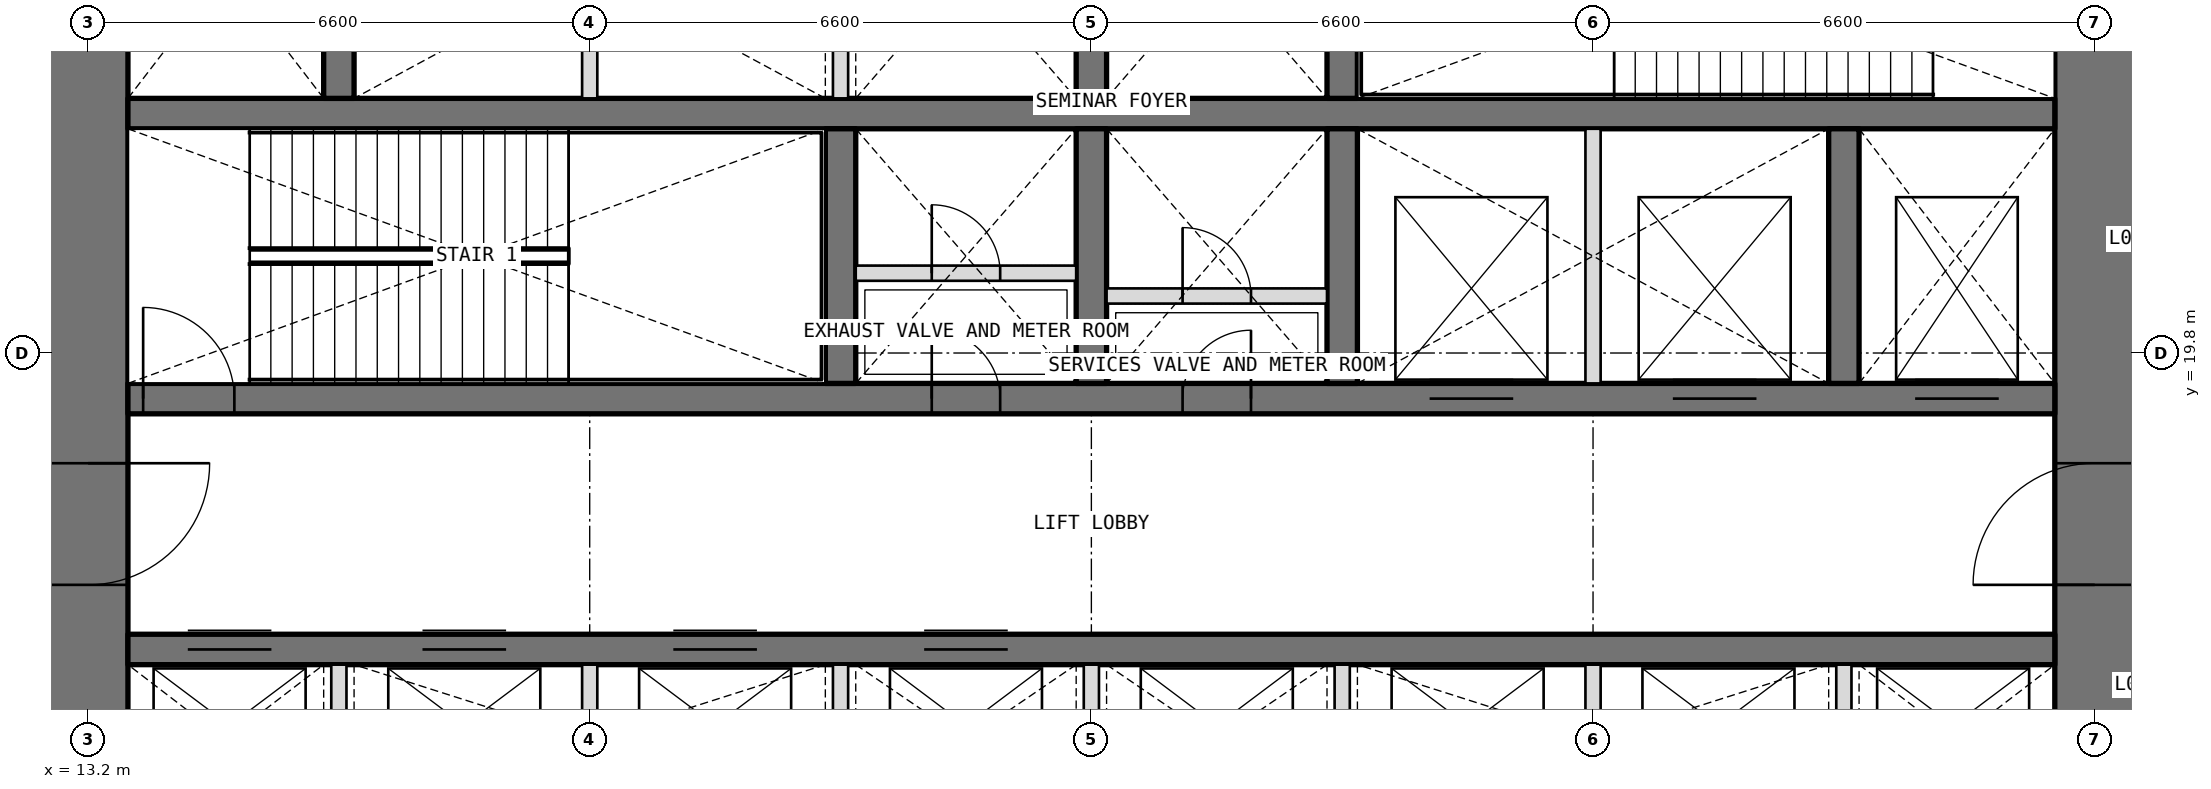
"""IFC4 building model, lengths in metres.
Left out: names, types, materials, properties, quantities, classifications, styles, units other than length and angle.
Written with IfcOpenShell. Run it as: python <this file> out.ifc"""

import sys

from ifc_helpers import new_model, si_unit, direction, frame, frame_2d, origin, place, context, subcontext, project, spatial, rectangle, extrude, element, fill, save


model = new_model("IFC4")
c1 = context("Model", 3, precision=1e-05, world=origin(), true_north=direction((0.0, 1.0)))
c2 = subcontext(c1, "Body", "Model", "MODEL_VIEW")
j1 = project(units=[si_unit("LENGTHUNIT", "METRE"), si_unit("PLANEANGLEUNIT", "RADIAN")], contexts=[c1])
p1 = place(None, origin())
s1 = spatial("IfcSite", under=j1, at=p1, CompositionType="ELEMENT")
p2 = place(p1, origin())
s2 = spatial("IfcBuilding", under=s1, at=p2, CompositionType="ELEMENT")
p3 = place(p2, frame((0.0, 0.0, 7.2)))
s3 = spatial("IfcBuildingStorey", under=s2, at=p3, CompositionType="ELEMENT", Elevation=7.2)
p4 = place(p3, frame((39.6, 13.725, 0.0), z_axis=(0.0, 0.0, 1.0), x_axis=(0.0, 1.0, 0.0)))
e1 = element("IfcWall", 1, at=p4, inside=s3, PredefinedType="SHEAR", context=c2, shape_type="SweptSolid", body=[
    extrude(rectangle(XDim=18.75, YDim=1.05, at=frame_2d((9.375, 0.0))), origin(), (0.0, 0.0, 1.0), 5.4),
])
p5 = place(p4, frame((3.025, 0.0, 0.0)))
e2 = element("IfcOpeningElement", 2, at=p5, cuts=e1, PredefinedType="OPENING", context=c2, shape_type="SweptSolid", body=[
    extrude(rectangle(XDim=1.6, YDim=2.1, at=frame_2d((0.8, 1.05))), frame((0.0, 0.535, 0.0), z_axis=(0.0, -1.0, 0.0), x_axis=(1.0, 0.0, 0.0)), (0.0, 0.0, 1.0), 1.07),
])
p6 = place(p4, frame((13.825, 0.0, 0.0)))
e3 = element("IfcOpeningElement", 3, at=p6, cuts=e1, PredefinedType="OPENING", context=c2, shape_type="SweptSolid", body=[
    extrude(rectangle(XDim=1.6, YDim=2.1, at=frame_2d((0.8, 1.05))), frame((0.0, 0.535, 0.0), z_axis=(0.0, -1.0, 0.0), x_axis=(1.0, 0.0, 0.0)), (0.0, 0.0, 1.0), 1.07),
])
p7 = place(p3, frame((13.2, 32.475, 0.0), z_axis=(0.0, 0.0, 1.0), x_axis=(0.0, -1.0, 0.0)))
e4 = element("IfcWall", 4, at=p7, inside=s3, PredefinedType="SHEAR", context=c2, shape_type="SweptSolid", body=[
    extrude(rectangle(XDim=18.75, YDim=1.05, at=frame_2d((9.375, 0.0))), origin(), (0.0, 0.0, 1.0), 5.4),
])
p8 = place(p7, frame((14.125, 0.0, 0.0)))
e5 = element("IfcOpeningElement", 5, at=p8, cuts=e4, PredefinedType="OPENING", context=c2, shape_type="SweptSolid", body=[
    extrude(rectangle(XDim=1.6, YDim=2.1, at=frame_2d((0.8, 1.05))), frame((0.0, 0.535, 0.0), z_axis=(0.0, -1.0, 0.0), x_axis=(1.0, 0.0, 0.0)), (0.0, 0.0, 1.0), 1.07),
])
p9 = place(p7, frame((3.325, 0.0, 0.0)))
e6 = element("IfcOpeningElement", 6, at=p9, cuts=e4, PredefinedType="OPENING", context=c2, shape_type="SweptSolid", body=[
    extrude(rectangle(XDim=1.6, YDim=2.1, at=frame_2d((0.8, 1.05))), frame((0.0, 0.535, 0.0), z_axis=(0.0, -1.0, 0.0), x_axis=(1.0, 0.0, 0.0)), (0.0, 0.0, 1.0), 1.07),
])
p10 = place(p3, frame((13.725, 15.9, 0.0), z_axis=(0.0, 0.0, 1.0), x_axis=(1.0, 0.0, 0.0)))
e7 = element("IfcWall", 7, at=p10, inside=s3, PredefinedType="SHEAR", context=c2, shape_type="SweptSolid", body=[
    extrude(rectangle(XDim=25.35, YDim=0.4, at=frame_2d((12.675, 0.0))), origin(), (0.0, 0.0, 1.0), 5.4),
])
p11 = place(p10, frame((0.788, 0.0, 0.0)))
e8 = element("IfcOpeningElement", 8, at=p11, cuts=e7, PredefinedType="OPENING", context=c2, shape_type="SweptSolid", body=[
    extrude(rectangle(XDim=1.1, YDim=2.1, at=frame_2d((0.55, 1.05))), frame((0.0, 0.21, 0.0), z_axis=(0.0, -1.0, 0.0), x_axis=(1.0, 0.0, 0.0)), (0.0, 0.0, 1.0), 0.42),
])
p12 = place(p10, frame((3.875, 0.0, 0.0)))
e9 = element("IfcOpeningElement", 9, at=p12, cuts=e7, PredefinedType="OPENING", context=c2, shape_type="SweptSolid", body=[
    extrude(rectangle(XDim=1.1, YDim=2.1, at=frame_2d((0.55, 1.05))), frame((0.0, 0.21, 0.0), z_axis=(0.0, -1.0, 0.0), x_axis=(1.0, 0.0, 0.0)), (0.0, 0.0, 1.0), 0.42),
])
p13 = place(p10, frame((7.175, 0.0, 0.0)))
e10 = element("IfcOpeningElement", 10, at=p13, cuts=e7, PredefinedType="OPENING", context=c2, shape_type="SweptSolid", body=[
    extrude(rectangle(XDim=1.1, YDim=2.1, at=frame_2d((0.55, 1.05))), frame((0.0, 0.21, 0.0), z_axis=(0.0, -1.0, 0.0), x_axis=(1.0, 0.0, 0.0)), (0.0, 0.0, 1.0), 0.42),
])
p14 = place(p10, frame((10.475, 0.0, 0.0)))
e11 = element("IfcOpeningElement", 11, at=p14, cuts=e7, PredefinedType="OPENING", context=c2, shape_type="SweptSolid", body=[
    extrude(rectangle(XDim=1.1, YDim=2.1, at=frame_2d((0.55, 1.05))), frame((0.0, 0.21, 0.0), z_axis=(0.0, -1.0, 0.0), x_axis=(1.0, 0.0, 0.0)), (0.0, 0.0, 1.0), 0.42),
])
p15 = place(p3, frame((13.725, 19.2, 0.0), z_axis=(0.0, 0.0, 1.0), x_axis=(1.0, 0.0, 0.0)))
e12 = element("IfcWall", 12, at=p15, inside=s3, PredefinedType="SHEAR", context=c2, shape_type="SweptSolid", body=[
    extrude(rectangle(XDim=25.35, YDim=0.4, at=frame_2d((12.675, 0.0))), origin(), (0.0, 0.0, 1.0), 5.4),
])
p16 = place(p15, frame((10.575, 0.0, 0.0)))
e13 = element("IfcOpeningElement", 13, at=p16, cuts=e12, PredefinedType="OPENING", context=c2, shape_type="SweptSolid", body=[
    extrude(rectangle(XDim=0.9, YDim=2.1, at=frame_2d((0.45, 1.05))), frame((0.0, 0.21, 0.0), z_axis=(0.0, -1.0, 0.0), x_axis=(1.0, 0.0, 0.0)), (0.0, 0.0, 1.0), 0.42),
])
p17 = place(p15, frame((13.875, 0.0, 0.0)))
e14 = element("IfcOpeningElement", 14, at=p17, cuts=e12, PredefinedType="OPENING", context=c2, shape_type="SweptSolid", body=[
    extrude(rectangle(XDim=0.9, YDim=2.1, at=frame_2d((0.45, 1.05))), frame((0.0, 0.21, 0.0), z_axis=(0.0, -1.0, 0.0), x_axis=(1.0, 0.0, 0.0)), (0.0, 0.0, 1.0), 0.42),
])
p18 = place(p15, frame((0.2, 0.0, 0.0)))
e15 = element("IfcOpeningElement", 15, at=p18, cuts=e12, PredefinedType="OPENING", context=c2, shape_type="SweptSolid", body=[
    extrude(rectangle(XDim=1.2, YDim=2.1, at=frame_2d((0.6, 1.05))), frame((0.0, 0.21, 0.0), z_axis=(0.0, -1.0, 0.0), x_axis=(1.0, 0.0, 0.0)), (0.0, 0.0, 1.0), 0.42),
])
p19 = place(p15, frame((23.512, 0.0, 0.0)))
e16 = element("IfcOpeningElement", 16, at=p19, cuts=e12, PredefinedType="OPENING", context=c2, shape_type="SweptSolid", body=[
    extrude(rectangle(XDim=1.1, YDim=2.1, at=frame_2d((0.55, 1.05))), frame((0.0, 0.21, 0.0), z_axis=(0.0, -1.0, 0.0), x_axis=(1.0, 0.0, 0.0)), (0.0, 0.0, 1.0), 0.42),
])
p20 = place(p15, frame((17.125, 0.0, 0.0)))
e17 = element("IfcOpeningElement", 17, at=p20, cuts=e12, PredefinedType="OPENING", context=c2, shape_type="SweptSolid", body=[
    extrude(rectangle(XDim=1.1, YDim=2.1, at=frame_2d((0.55, 1.05))), frame((0.0, 0.21, 0.0), z_axis=(0.0, -1.0, 0.0), x_axis=(1.0, 0.0, 0.0)), (0.0, 0.0, 1.0), 0.42),
])
p21 = place(p15, frame((20.325, 0.0, 0.0)))
e18 = element("IfcOpeningElement", 18, at=p21, cuts=e12, PredefinedType="OPENING", context=c2, shape_type="SweptSolid", body=[
    extrude(rectangle(XDim=1.1, YDim=2.1, at=frame_2d((0.55, 1.05))), frame((0.0, 0.21, 0.0), z_axis=(0.0, -1.0, 0.0), x_axis=(1.0, 0.0, 0.0)), (0.0, 0.0, 1.0), 0.42),
])
p22 = place(p3, frame((13.725, 22.95, 0.0), z_axis=(0.0, 0.0, 1.0), x_axis=(1.0, 0.0, 0.0)))
e19 = element("IfcWall", 19, at=p22, inside=s3, PredefinedType="SHEAR", context=c2, shape_type="SweptSolid", body=[
    extrude(rectangle(XDim=25.35, YDim=0.4, at=frame_2d((12.675, 0.0))), origin(), (0.0, 0.0, 1.0), 5.4),
])
for number, where, z_axis, x_axis in (
    (20, (23.1, 19.4, 0.0), (0.0, 0.0, 1.0), (0.0, 1.0, 0.0)),
    (21, (26.4, 19.4, 0.0), (0.0, 0.0, 1.0), (0.0, 1.0, 0.0)),
    (22, (29.7, 19.4, 0.0), (0.0, 0.0, 1.0), (0.0, 1.0, 0.0)),
    (23, (36.3, 19.4, 0.0), (0.0, 0.0, 1.0), (0.0, 1.0, 0.0)),
    (24, (16.5, 23.15, 0.0), (0.0, 0.0, 1.0), (0.0, 1.0, 0.0)),
    (25, (26.4, 23.15, 0.0), (0.0, 0.0, 1.0), (0.0, 1.0, 0.0)),
    (26, (29.7, 23.15, 0.0), (0.0, 0.0, 1.0), (0.0, 1.0, 0.0)),
):
    element("IfcWall", number, at=place(p3, frame(where, z_axis=z_axis, x_axis=x_axis)), inside=s3, PredefinedType="SHEAR", context=c2, shape_type="SweptSolid", body=[
        extrude(rectangle(XDim=3.35, YDim=0.4, at=frame_2d((1.675, 0.0))), origin(), (0.0, 0.0, 1.0), 5.4),
    ])
for number, where, z_axis, x_axis in (
    (27, (16.5, 13.725, 0.0), (0.0, 0.0, 1.0), (0.0, 1.0, 0.0)),
    (28, (19.8, 13.725, 0.0), (0.0, 0.0, 1.0), (0.0, 1.0, 0.0)),
    (29, (23.1, 13.725, 0.0), (0.0, 0.0, 1.0), (0.0, 1.0, 0.0)),
    (30, (26.4, 13.725, 0.0), (0.0, 0.0, 1.0), (0.0, 1.0, 0.0)),
    (31, (29.7, 13.725, 0.0), (0.0, 0.0, 1.0), (0.0, 1.0, 0.0)),
    (32, (33.0, 13.725, 0.0), (0.0, 0.0, 1.0), (0.0, 1.0, 0.0)),
    (33, (36.3, 13.725, 0.0), (0.0, 0.0, 1.0), (0.0, 1.0, 0.0)),
):
    element("IfcWall", number, at=place(p3, frame(where, z_axis=z_axis, x_axis=x_axis)), inside=s3, PredefinedType="PARTITIONING", context=c2, shape_type="SweptSolid", body=[
        extrude(rectangle(XDim=1.975, YDim=0.2, at=frame_2d((0.987, 0.0))), origin(), (0.0, 0.0, 1.0), 5.4),
    ])
for number, where, z_axis, x_axis in (
    (34, (33.0, 19.4, 0.0), (0.0, 0.0, 1.0), (0.0, 1.0, 0.0)),
    (35, (19.8, 23.15, 0.0), (0.0, 0.0, 1.0), (0.0, 1.0, 0.0)),
    (36, (23.1, 23.15, 0.0), (0.0, 0.0, 1.0), (0.0, 1.0, 0.0)),
):
    element("IfcWall", number, at=place(p3, frame(where, z_axis=z_axis, x_axis=x_axis)), inside=s3, PredefinedType="PARTITIONING", context=c2, shape_type="SweptSolid", body=[
        extrude(rectangle(XDim=3.35, YDim=0.2, at=frame_2d((1.675, 0.0))), origin(), (0.0, 0.0, 1.0), 5.4),
    ])
p23 = place(p3, frame((23.3, 20.85, 0.0), z_axis=(0.0, 0.0, 1.0), x_axis=(1.0, 0.0, 0.0)))
e37 = element("IfcWall", 37, at=p23, inside=s3, PredefinedType="PARTITIONING", context=c2, shape_type="SweptSolid", body=[
    extrude(rectangle(XDim=2.9, YDim=0.2, at=frame_2d((1.45, 0.0))), origin(), (0.0, 0.0, 1.0), 5.1),
])
p24 = place(p23, frame((1.0, 0.0, 0.0)))
e38 = element("IfcOpeningElement", 38, at=p24, cuts=e37, PredefinedType="OPENING", context=c2, shape_type="SweptSolid", body=[
    extrude(rectangle(XDim=0.9, YDim=2.1, at=frame_2d((0.45, 1.05))), frame((0.0, 0.11, 0.0), z_axis=(0.0, -1.0, 0.0), x_axis=(1.0, 0.0, 0.0)), (0.0, 0.0, 1.0), 0.22),
])
p25 = place(p3, frame((26.6, 20.55, 0.0), z_axis=(0.0, 0.0, 1.0), x_axis=(1.0, 0.0, 0.0)))
e39 = element("IfcWall", 39, at=p25, inside=s3, PredefinedType="PARTITIONING", context=c2, shape_type="SweptSolid", body=[
    extrude(rectangle(XDim=2.9, YDim=0.2, at=frame_2d((1.45, 0.0))), origin(), (0.0, 0.0, 1.0), 5.1),
])
p26 = place(p25, frame((1.0, 0.0, 0.0)))
e40 = element("IfcOpeningElement", 40, at=p26, cuts=e39, PredefinedType="OPENING", context=c2, shape_type="SweptSolid", body=[
    extrude(rectangle(XDim=0.9, YDim=2.1, at=frame_2d((0.45, 1.05))), frame((0.0, 0.11, 0.0), z_axis=(0.0, -1.0, 0.0), x_axis=(1.0, 0.0, 0.0)), (0.0, 0.0, 1.0), 0.22),
])
p27 = place(p16, origin())
e41 = element("IfcDoor", 41, at=p27, inside=s3, OperationType="SINGLE_SWING_LEFT", PredefinedType="DOOR", context=c2, shape_type="SweptSolid", body=[
    extrude(rectangle(XDim=0.9, YDim=2.1, at=frame_2d((0.45, 1.05))), frame((0.0, 0.025, 0.0), z_axis=(0.0, -1.0, 0.0), x_axis=(1.0, 0.0, 0.0)), (0.0, 0.0, 1.0), 0.05),
])
fill(e13, e41)
p28 = place(p24, origin())
e42 = element("IfcDoor", 42, at=p28, inside=s3, OperationType="SINGLE_SWING_LEFT", PredefinedType="DOOR", context=c2, shape_type="SweptSolid", body=[
    extrude(rectangle(XDim=0.9, YDim=2.1, at=frame_2d((0.45, 1.05))), frame((0.0, 0.025, 0.0), z_axis=(0.0, -1.0, 0.0), x_axis=(1.0, 0.0, 0.0)), (0.0, 0.0, 1.0), 0.05),
])
fill(e38, e42)
p29 = place(p17, origin())
e43 = element("IfcDoor", 43, at=p29, inside=s3, OperationType="SINGLE_SWING_RIGHT", PredefinedType="DOOR", context=c2, shape_type="SweptSolid", body=[
    extrude(rectangle(XDim=0.9, YDim=2.1, at=frame_2d((0.45, 1.05))), frame((0.0, 0.025, 0.0), z_axis=(0.0, -1.0, 0.0), x_axis=(1.0, 0.0, 0.0)), (0.0, 0.0, 1.0), 0.05),
])
fill(e14, e43)
p30 = place(p26, origin())
e44 = element("IfcDoor", 44, at=p30, inside=s3, OperationType="SINGLE_SWING_LEFT", PredefinedType="DOOR", context=c2, shape_type="SweptSolid", body=[
    extrude(rectangle(XDim=0.9, YDim=2.1, at=frame_2d((0.45, 1.05))), frame((0.0, 0.025, 0.0), z_axis=(0.0, -1.0, 0.0), x_axis=(1.0, 0.0, 0.0)), (0.0, 0.0, 1.0), 0.05),
])
fill(e40, e44)
p31 = place(p18, origin())
e45 = element("IfcDoor", 45, at=p31, inside=s3, OperationType="SINGLE_SWING_LEFT", PredefinedType="DOOR", context=c2, shape_type="SweptSolid", body=[
    extrude(rectangle(XDim=1.2, YDim=2.1, at=frame_2d((0.6, 1.05))), frame((0.0, 0.025, 0.0), z_axis=(0.0, -1.0, 0.0), x_axis=(1.0, 0.0, 0.0)), (0.0, 0.0, 1.0), 0.05),
])
fill(e15, e45)
p32 = place(p8, origin())
e46 = element("IfcDoor", 46, at=p32, inside=s3, OperationType="DOUBLE_DOOR_DOUBLE_SWING", PredefinedType="DOOR", context=c2, shape_type="SweptSolid", body=[
    extrude(rectangle(XDim=1.6, YDim=2.1, at=frame_2d((0.8, 1.05))), frame((0.0, 0.025, 0.0), z_axis=(0.0, -1.0, 0.0), x_axis=(1.0, 0.0, 0.0)), (0.0, 0.0, 1.0), 0.05),
])
fill(e5, e46)
p33 = place(p5, origin())
e47 = element("IfcDoor", 47, at=p33, inside=s3, OperationType="DOUBLE_DOOR_DOUBLE_SWING", PredefinedType="DOOR", context=c2, shape_type="SweptSolid", body=[
    extrude(rectangle(XDim=1.6, YDim=2.1, at=frame_2d((0.8, 1.05))), frame((0.0, 0.025, 0.0), z_axis=(0.0, -1.0, 0.0), x_axis=(1.0, 0.0, 0.0)), (0.0, 0.0, 1.0), 0.05),
])
fill(e2, e47)
p34 = place(p11, origin())
e48 = element("IfcDoor", 48, at=p34, inside=s3, OperationType="DOUBLE_DOOR_SLIDING", PredefinedType="DOOR", context=c2, shape_type="SweptSolid", body=[
    extrude(rectangle(XDim=1.1, YDim=2.1, at=frame_2d((0.55, 1.05))), frame((0.0, 0.025, 0.0), z_axis=(0.0, -1.0, 0.0), x_axis=(1.0, 0.0, 0.0)), (0.0, 0.0, 1.0), 0.05),
])
fill(e8, e48)
p35 = place(p12, origin())
e49 = element("IfcDoor", 49, at=p35, inside=s3, OperationType="DOUBLE_DOOR_SLIDING", PredefinedType="DOOR", context=c2, shape_type="SweptSolid", body=[
    extrude(rectangle(XDim=1.1, YDim=2.1, at=frame_2d((0.55, 1.05))), frame((0.0, 0.025, 0.0), z_axis=(0.0, -1.0, 0.0), x_axis=(1.0, 0.0, 0.0)), (0.0, 0.0, 1.0), 0.05),
])
fill(e9, e49)
p36 = place(p13, origin())
e50 = element("IfcDoor", 50, at=p36, inside=s3, OperationType="DOUBLE_DOOR_SLIDING", PredefinedType="DOOR", context=c2, shape_type="SweptSolid", body=[
    extrude(rectangle(XDim=1.1, YDim=2.1, at=frame_2d((0.55, 1.05))), frame((0.0, 0.025, 0.0), z_axis=(0.0, -1.0, 0.0), x_axis=(1.0, 0.0, 0.0)), (0.0, 0.0, 1.0), 0.05),
])
fill(e10, e50)
p37 = place(p14, origin())
e51 = element("IfcDoor", 51, at=p37, inside=s3, OperationType="DOUBLE_DOOR_SLIDING", PredefinedType="DOOR", context=c2, shape_type="SweptSolid", body=[
    extrude(rectangle(XDim=1.1, YDim=2.1, at=frame_2d((0.55, 1.05))), frame((0.0, 0.025, 0.0), z_axis=(0.0, -1.0, 0.0), x_axis=(1.0, 0.0, 0.0)), (0.0, 0.0, 1.0), 0.05),
])
fill(e11, e51)
p38 = place(p19, origin())
e52 = element("IfcDoor", 52, at=p38, inside=s3, OperationType="DOUBLE_DOOR_SLIDING", PredefinedType="DOOR", context=c2, shape_type="SweptSolid", body=[
    extrude(rectangle(XDim=1.1, YDim=2.1, at=frame_2d((0.55, 1.05))), frame((0.0, 0.025, 0.0), z_axis=(0.0, -1.0, 0.0), x_axis=(1.0, 0.0, 0.0)), (0.0, 0.0, 1.0), 0.05),
])
fill(e16, e52)
p39 = place(p20, origin())
e53 = element("IfcDoor", 53, at=p39, inside=s3, OperationType="DOUBLE_DOOR_SLIDING", PredefinedType="DOOR", context=c2, shape_type="SweptSolid", body=[
    extrude(rectangle(XDim=1.1, YDim=2.1, at=frame_2d((0.55, 1.05))), frame((0.0, 0.025, 0.0), z_axis=(0.0, -1.0, 0.0), x_axis=(1.0, 0.0, 0.0)), (0.0, 0.0, 1.0), 0.05),
])
fill(e17, e53)
p40 = place(p21, origin())
e54 = element("IfcDoor", 54, at=p40, inside=s3, OperationType="DOUBLE_DOOR_SLIDING", PredefinedType="DOOR", context=c2, shape_type="SweptSolid", body=[
    extrude(rectangle(XDim=1.1, YDim=2.1, at=frame_2d((0.55, 1.05))), frame((0.0, 0.025, 0.0), z_axis=(0.0, -1.0, 0.0), x_axis=(1.0, 0.0, 0.0)), (0.0, 0.0, 1.0), 0.05),
])
fill(e18, e54)
save(model, sys.argv[1])
